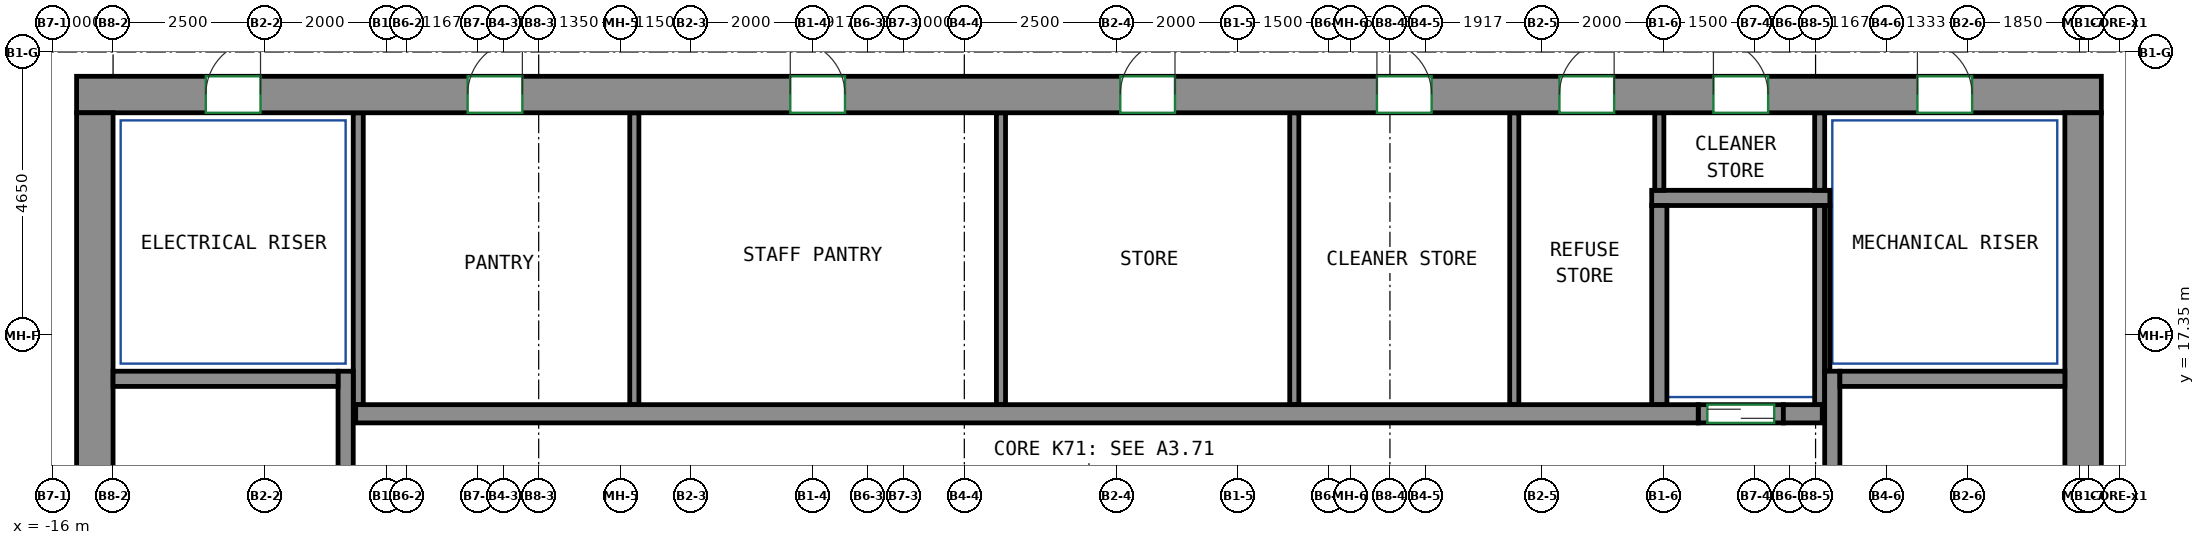
"""IFC4 building model, lengths in metres.
Left out: names, types, materials, properties, quantities, classifications, styles, units other than length and angle.
Written with IfcOpenShell. Run it as: python <this file> out.ifc"""

import sys

from ifc_helpers import new_model, si_unit, direction, frame, frame_2d, origin, place, context, subcontext, project, spatial, rectangle, extrude, source, transform, mapped, element, fill, save


model = new_model("IFC4")
c1 = context("Model", 3, precision=1e-05, world=origin(), true_north=direction((0.0, 1.0)))
c2 = subcontext(c1, "Body", "Model", "MODEL_VIEW")
j1 = project(units=[si_unit("LENGTHUNIT", "METRE"), si_unit("PLANEANGLEUNIT", "RADIAN")], contexts=[c1])
p1 = place(None, origin())
s1 = spatial("IfcSite", under=j1, at=p1, CompositionType="ELEMENT")
p2 = place(p1, origin())
s2 = spatial("IfcBuilding", under=s1, at=p2, CompositionType="ELEMENT")
p3 = place(p2, frame((0.0, 0.0, 284.0)))
s3 = spatial("IfcBuildingStorey", under=s2, at=p3, CompositionType="ELEMENT", Elevation=284.0)
m1 = source(origin(), c2, "Body", "SweptSolid", [
    extrude(rectangle(XDim=33.3, YDim=0.6, at=frame_2d((16.65, 0.0))), origin(), (0.0, 0.0, 1.0), 3.12),
])
p4 = place(p3, frame((-15.6, 21.3, 0.0), z_axis=(0.0, 0.0, 1.0), x_axis=(1.0, 0.0, 0.0)))
e1 = element("IfcWall", 1, at=p4, inside=s3, PredefinedType="SHEAR", context=c2, shape_type="MappedRepresentation", body=[
    mapped(m1, transform((0.0, 0.0, 0.0))),
])
p5 = place(p4, frame((6.431, 0.0, 0.0)))
e2 = element("IfcOpeningElement", 2, at=p5, cuts=e1, PredefinedType="OPENING", context=c2, shape_type="SweptSolid", body=[
    extrude(rectangle(XDim=0.9, YDim=2.1, at=frame_2d((0.45, 1.05))), frame((0.0, 0.31, 0.0), z_axis=(0.0, -1.0, 0.0), x_axis=(1.0, 0.0, 0.0)), (0.0, 0.0, 1.0), 0.62),
])
p6 = place(p4, frame((11.738, 0.0, 0.0)))
e3 = element("IfcOpeningElement", 3, at=p6, cuts=e1, PredefinedType="OPENING", context=c2, shape_type="SweptSolid", body=[
    extrude(rectangle(XDim=0.9, YDim=2.1, at=frame_2d((0.45, 1.05))), frame((0.0, 0.31, 0.0), z_axis=(0.0, -1.0, 0.0), x_axis=(1.0, 0.0, 0.0)), (0.0, 0.0, 1.0), 0.62),
])
p7 = place(p4, frame((17.165, 0.0, 0.0)))
e4 = element("IfcOpeningElement", 4, at=p7, cuts=e1, PredefinedType="OPENING", context=c2, shape_type="SweptSolid", body=[
    extrude(rectangle(XDim=0.9, YDim=2.1, at=frame_2d((0.45, 1.05))), frame((0.0, 0.31, 0.0), z_axis=(0.0, -1.0, 0.0), x_axis=(1.0, 0.0, 0.0)), (0.0, 0.0, 1.0), 0.62),
])
p8 = place(p4, frame((21.386, 0.0, 0.0)))
e5 = element("IfcOpeningElement", 5, at=p8, cuts=e1, PredefinedType="OPENING", context=c2, shape_type="SweptSolid", body=[
    extrude(rectangle(XDim=0.9, YDim=2.1, at=frame_2d((0.45, 1.05))), frame((0.0, 0.31, 0.0), z_axis=(0.0, -1.0, 0.0), x_axis=(1.0, 0.0, 0.0)), (0.0, 0.0, 1.0), 0.62),
])
p9 = place(p4, frame((24.387, 0.0, 0.0)))
e6 = element("IfcOpeningElement", 6, at=p9, cuts=e1, PredefinedType="OPENING", context=c2, shape_type="SweptSolid", body=[
    extrude(rectangle(XDim=0.9, YDim=2.1, at=frame_2d((0.45, 1.05))), frame((0.0, 0.31, 0.0), z_axis=(0.0, -1.0, 0.0), x_axis=(1.0, 0.0, 0.0)), (0.0, 0.0, 1.0), 0.62),
])
p10 = place(p4, frame((26.92, 0.0, 0.0)))
e7 = element("IfcOpeningElement", 7, at=p10, cuts=e1, PredefinedType="OPENING", context=c2, shape_type="SweptSolid", body=[
    extrude(rectangle(XDim=0.9, YDim=2.1, at=frame_2d((0.45, 1.05))), frame((0.0, 0.31, 0.0), z_axis=(0.0, -1.0, 0.0), x_axis=(1.0, 0.0, 0.0)), (0.0, 0.0, 1.0), 0.62),
])
p11 = place(p4, frame((2.125, 0.0, 0.0)))
e8 = element("IfcOpeningElement", 8, at=p11, cuts=e1, PredefinedType="OPENING", context=c2, shape_type="SweptSolid", body=[
    extrude(rectangle(XDim=0.9, YDim=2.1, at=frame_2d((0.45, 1.05))), frame((0.0, 0.31, 0.0), z_axis=(0.0, -1.0, 0.0), x_axis=(1.0, 0.0, 0.0)), (0.0, 0.0, 1.0), 0.62),
])
p12 = place(p4, frame((30.275, 0.0, 0.0)))
e9 = element("IfcOpeningElement", 9, at=p12, cuts=e1, PredefinedType="OPENING", context=c2, shape_type="SweptSolid", body=[
    extrude(rectangle(XDim=0.9, YDim=2.1, at=frame_2d((0.45, 1.05))), frame((0.0, 0.31, 0.0), z_axis=(0.0, -1.0, 0.0), x_axis=(1.0, 0.0, 0.0)), (0.0, 0.0, 1.0), 0.62),
])
m2 = source(origin(), c2, "Body", "SweptSolid", [
    extrude(rectangle(XDim=12.0, YDim=0.6, at=frame_2d((6.0, 0.0))), origin(), (0.0, 0.0, 1.0), 3.12),
])
for number, where, z_axis, x_axis in (
    (10, (-15.3, 9.0, 0.0), (0.0, 0.0, 1.0), (0.0, 1.0, 0.0)),
    (11, (17.4, 9.0, 0.0), (0.0, 0.0, 1.0), (0.0, 1.0, 0.0)),
):
    element("IfcWall", number, at=place(p3, frame(where, z_axis=z_axis, x_axis=x_axis)), inside=s3, PredefinedType="SHEAR", context=c2, shape_type="MappedRepresentation", body=[
        mapped(m2, transform((0.0, 0.0, 0.0))),
    ])
m3 = source(origin(), c2, "Body", "SweptSolid", [
    extrude(rectangle(XDim=7.75, YDim=0.25, at=frame_2d((3.875, 0.0))), origin(), (0.0, 0.0, 1.0), 3.12),
])
p13 = place(p3, frame((-11.175, 9.0, 0.0), z_axis=(0.0, 0.0, 1.0), x_axis=(0.0, 1.0, 0.0)))
e12 = element("IfcWall", 12, at=p13, inside=s3, PredefinedType="SHEAR", context=c2, shape_type="MappedRepresentation", body=[
    mapped(m3, transform((0.0, 0.0, 0.0))),
])
m4 = source(origin(), c2, "Body", "SweptSolid", [
    extrude(rectangle(XDim=3.7, YDim=0.25, at=frame_2d((1.85, 0.0))), origin(), (0.0, 0.0, 1.0), 3.12),
])
p14 = place(p3, frame((-15.0, 16.625, 0.0), z_axis=(0.0, 0.0, 1.0), x_axis=(1.0, 0.0, 0.0)))
e13 = element("IfcWall", 13, at=p14, inside=s3, PredefinedType="SHEAR", context=c2, shape_type="MappedRepresentation", body=[
    mapped(m4, transform((0.0, 0.0, 0.0))),
])
p15 = place(p3, frame((13.275, 9.0, 0.0), z_axis=(0.0, 0.0, 1.0), x_axis=(0.0, 1.0, 0.0)))
e14 = element("IfcWall", 14, at=p15, inside=s3, PredefinedType="SHEAR", context=c2, shape_type="MappedRepresentation", body=[
    mapped(m3, transform((0.0, 0.0, 0.0))),
])
m5 = source(origin(), c2, "Body", "SweptSolid", [
    extrude(rectangle(XDim=3.7, YDim=0.25, at=frame_2d((1.85, 0.0))), origin(), (0.0, 0.0, 1.0), 3.12),
])
p16 = place(p3, frame((13.4, 16.625, 0.0), z_axis=(0.0, 0.0, 1.0), x_axis=(1.0, 0.0, 0.0)))
e15 = element("IfcWall", 15, at=p16, inside=s3, PredefinedType="SHEAR", context=c2, shape_type="MappedRepresentation", body=[
    mapped(m5, transform((0.0, 0.0, 0.0))),
])
m6 = source(origin(), c2, "Body", "SweptSolid", [
    extrude(rectangle(XDim=22.08, YDim=0.3, at=frame_2d((11.04, 0.0))), origin(), (0.0, 0.0, 1.0), 3.12),
])
p17 = place(p3, frame((-11.01, 16.05, 0.0), z_axis=(0.0, 0.0, 1.0), x_axis=(1.0, 0.0, 0.0)))
e16 = element("IfcWall", 16, at=p17, inside=s3, PredefinedType="SHEAR", context=c2, shape_type="MappedRepresentation", body=[
    mapped(m6, transform((0.0, 0.0, 0.0))),
])
m7 = source(origin(), c2, "Body", "SweptSolid", [
    extrude(rectangle(XDim=0.64, YDim=0.3, at=frame_2d((0.32, 0.0))), origin(), (0.0, 0.0, 1.0), 3.12),
])
p18 = place(p3, frame((12.47, 16.05, 0.0), z_axis=(0.0, 0.0, 1.0), x_axis=(1.0, 0.0, 0.0)))
e17 = element("IfcWall", 17, at=p18, inside=s3, PredefinedType="SHEAR", context=c2, shape_type="MappedRepresentation", body=[
    mapped(m7, transform((0.0, 0.0, 0.0))),
])
m8 = source(origin(), c2, "Body", "SweptSolid", [
    extrude(rectangle(XDim=1.4, YDim=0.3, at=frame_2d((0.7, 0.0))), origin(), (0.0, 0.0, 1.0), 3.12),
])
p19 = place(p3, frame((11.07, 16.05, 0.0), z_axis=(0.0, 0.0, 1.0), x_axis=(1.0, 0.0, 0.0)))
e18 = element("IfcWall", 18, at=p19, inside=s3, PredefinedType="PARTITIONING", context=c2, shape_type="MappedRepresentation", body=[
    mapped(m8, transform((0.0, 0.0, 0.0))),
])
p20 = place(p19, frame((0.15, 0.0, 0.0)))
e19 = element("IfcOpeningElement", 19, at=p20, cuts=e18, PredefinedType="OPENING", context=c2, shape_type="SweptSolid", body=[
    extrude(rectangle(XDim=1.1, YDim=2.1, at=frame_2d((0.55, 1.05))), frame((0.0, 0.16, 0.0), z_axis=(0.0, -1.0, 0.0), x_axis=(1.0, 0.0, 0.0)), (0.0, 0.0, 1.0), 0.32),
])
m9 = source(origin(), c2, "Body", "SweptSolid", [
    extrude(rectangle(XDim=2.93, YDim=0.25, at=frame_2d((1.465, 0.0))), origin(), (0.0, 0.0, 1.0), 3.12),
])
p21 = place(p3, frame((10.305, 19.6, 0.0), z_axis=(0.0, 0.0, 1.0), x_axis=(1.0, 0.0, 0.0)))
e20 = element("IfcWall", 20, at=p21, inside=s3, PredefinedType="PARTITIONING", context=c2, shape_type="MappedRepresentation", body=[
    mapped(m9, transform((0.0, 0.0, 0.0))),
])
m10 = source(origin(), c2, "Body", "SweptSolid", [
    extrude(rectangle(XDim=3.275, YDim=0.165, at=frame_2d((1.638, 0.0))), origin(), (0.0, 0.0, 1.0), 3.12),
])
p22 = place(p3, frame((13.067, 16.2, 0.0), z_axis=(0.0, 0.0, 1.0), x_axis=(0.0, 1.0, 0.0)))
e21 = element("IfcWall", 21, at=p22, inside=s3, PredefinedType="PARTITIONING", context=c2, shape_type="MappedRepresentation", body=[
    mapped(m10, transform((0.0, 0.0, 0.0))),
])
m11 = source(origin(), c2, "Body", "SweptSolid", [
    extrude(rectangle(XDim=1.275, YDim=0.165, at=frame_2d((0.637, 0.0))), origin(), (0.0, 0.0, 1.0), 3.12),
])
p23 = place(p3, frame((13.067, 19.725, 0.0), z_axis=(0.0, 0.0, 1.0), x_axis=(0.0, 1.0, 0.0)))
e22 = element("IfcWall", 22, at=p23, inside=s3, PredefinedType="PARTITIONING", context=c2, shape_type="MappedRepresentation", body=[
    mapped(m11, transform((0.0, 0.0, 0.0))),
])
m12 = source(origin(), c2, "Body", "SweptSolid", [
    extrude(rectangle(XDim=4.8, YDim=0.165, at=frame_2d((2.4, 0.0))), origin(), (0.0, 0.0, 1.0), 3.12),
])
p24 = place(p3, frame((-10.968, 16.2, 0.0), z_axis=(0.0, 0.0, 1.0), x_axis=(0.0, 1.0, 0.0)))
e23 = element("IfcWall", 23, at=p24, inside=s3, PredefinedType="PARTITIONING", context=c2, shape_type="MappedRepresentation", body=[
    mapped(m12, transform((0.0, 0.0, 0.0))),
])
m13 = source(origin(), c2, "Body", "SweptSolid", [
    extrude(rectangle(XDim=3.275, YDim=0.25, at=frame_2d((1.638, 0.0))), origin(), (0.0, 0.0, 1.0), 3.12),
])
p25 = place(p3, frame((10.43, 16.2, 0.0), z_axis=(0.0, 0.0, 1.0), x_axis=(0.0, 1.0, 0.0)))
e24 = element("IfcWall", 24, at=p25, inside=s3, PredefinedType="PARTITIONING", context=c2, shape_type="MappedRepresentation", body=[
    mapped(m13, transform((0.0, 0.0, 0.0))),
])
m14 = source(origin(), c2, "Body", "SweptSolid", [
    extrude(rectangle(XDim=2.725, YDim=0.085, at=frame_2d((1.363, 0.0))), origin(), (0.0, 0.0, 1.0), 3.12),
])
p26 = place(p3, frame((13.192, 16.75, 0.0), z_axis=(0.0, 0.0, 1.0), x_axis=(0.0, 1.0, 0.0)))
e25 = element("IfcWall", 25, at=p26, inside=s3, PredefinedType="PARTITIONING", context=c2, shape_type="MappedRepresentation", body=[
    mapped(m14, transform((0.0, 0.0, 0.0))),
])
m15 = source(origin(), c2, "Body", "SweptSolid", [
    extrude(rectangle(XDim=4.8, YDim=0.15, at=frame_2d((2.4, 0.0))), origin(), (0.0, 0.0, 1.0), 3.12),
])
for number, where, z_axis, x_axis in (
    (26, (-6.427, 16.2, 0.0), (0.0, 0.0, 1.0), (0.0, 1.0, 0.0)),
    (27, (-0.397, 16.2, 0.0), (0.0, 0.0, 1.0), (0.0, 1.0, 0.0)),
    (28, (4.427, 16.2, 0.0), (0.0, 0.0, 1.0), (0.0, 1.0, 0.0)),
    (29, (8.045, 16.2, 0.0), (0.0, 0.0, 1.0), (0.0, 1.0, 0.0)),
):
    element("IfcWall", number, at=place(p3, frame(where, z_axis=z_axis, x_axis=x_axis)), inside=s3, PredefinedType="PARTITIONING", context=c2, shape_type="MappedRepresentation", body=[
        mapped(m15, transform((0.0, 0.0, 0.0))),
    ])
m16 = source(origin(), c2, "Body", "SweptSolid", [
    extrude(rectangle(XDim=1.275, YDim=0.15, at=frame_2d((0.637, 0.0))), origin(), (0.0, 0.0, 1.0), 3.12),
])
p27 = place(p3, frame((10.43, 19.725, 0.0), z_axis=(0.0, 0.0, 1.0), x_axis=(0.0, 1.0, 0.0)))
e30 = element("IfcWall", 30, at=p27, inside=s3, PredefinedType="PARTITIONING", context=c2, shape_type="MappedRepresentation", body=[
    mapped(m16, transform((0.0, 0.0, 0.0))),
])
p28 = place(p20, origin())
e31 = element("IfcDoor", 31, at=p28, inside=s3, OperationType="DOUBLE_DOOR_SLIDING", PredefinedType="DOOR", context=c2, shape_type="SweptSolid", body=[
    extrude(rectangle(XDim=1.1, YDim=2.1, at=frame_2d((0.55, 1.05))), frame((0.0, 0.025, 0.0), z_axis=(0.0, -1.0, 0.0), x_axis=(1.0, 0.0, 0.0)), (0.0, 0.0, 1.0), 0.05),
])
fill(e19, e31)
p29 = place(p5, origin())
e32 = element("IfcDoor", 32, at=p29, inside=s3, OperationType="SINGLE_SWING_RIGHT", PredefinedType="DOOR", context=c2, shape_type="SweptSolid", body=[
    extrude(rectangle(XDim=0.9, YDim=2.1, at=frame_2d((0.45, 1.05))), frame((0.0, -0.155, 0.0), z_axis=(0.0, -1.0, 0.0), x_axis=(1.0, 0.0, 0.0)), (0.0, 0.0, 1.0), 0.05),
])
fill(e2, e32)
p30 = place(p6, origin())
e33 = element("IfcDoor", 33, at=p30, inside=s3, OperationType="SINGLE_SWING_LEFT", PredefinedType="DOOR", context=c2, shape_type="SweptSolid", body=[
    extrude(rectangle(XDim=0.9, YDim=2.1, at=frame_2d((0.45, 1.05))), frame((0.0, -0.155, 0.0), z_axis=(0.0, -1.0, 0.0), x_axis=(1.0, 0.0, 0.0)), (0.0, 0.0, 1.0), 0.05),
])
fill(e3, e33)
p31 = place(p7, origin())
e34 = element("IfcDoor", 34, at=p31, inside=s3, OperationType="SINGLE_SWING_RIGHT", PredefinedType="DOOR", context=c2, shape_type="SweptSolid", body=[
    extrude(rectangle(XDim=0.9, YDim=2.1, at=frame_2d((0.45, 1.05))), frame((0.0, -0.155, 0.0), z_axis=(0.0, -1.0, 0.0), x_axis=(1.0, 0.0, 0.0)), (0.0, 0.0, 1.0), 0.05),
])
fill(e4, e34)
p32 = place(p8, origin())
e35 = element("IfcDoor", 35, at=p32, inside=s3, OperationType="SINGLE_SWING_LEFT", PredefinedType="DOOR", context=c2, shape_type="SweptSolid", body=[
    extrude(rectangle(XDim=0.9, YDim=2.1, at=frame_2d((0.45, 1.05))), frame((0.0, -0.155, 0.0), z_axis=(0.0, -1.0, 0.0), x_axis=(1.0, 0.0, 0.0)), (0.0, 0.0, 1.0), 0.05),
])
fill(e5, e35)
p33 = place(p9, origin())
e36 = element("IfcDoor", 36, at=p33, inside=s3, OperationType="SINGLE_SWING_RIGHT", PredefinedType="DOOR", context=c2, shape_type="SweptSolid", body=[
    extrude(rectangle(XDim=0.9, YDim=2.1, at=frame_2d((0.45, 1.05))), frame((0.0, -0.155, 0.0), z_axis=(0.0, -1.0, 0.0), x_axis=(1.0, 0.0, 0.0)), (0.0, 0.0, 1.0), 0.05),
])
fill(e6, e36)
p34 = place(p10, origin())
e37 = element("IfcDoor", 37, at=p34, inside=s3, OperationType="SINGLE_SWING_LEFT", PredefinedType="DOOR", context=c2, shape_type="SweptSolid", body=[
    extrude(rectangle(XDim=0.9, YDim=2.1, at=frame_2d((0.45, 1.05))), frame((0.0, -0.155, 0.0), z_axis=(0.0, -1.0, 0.0), x_axis=(1.0, 0.0, 0.0)), (0.0, 0.0, 1.0), 0.05),
])
fill(e7, e37)
p35 = place(p11, origin())
e38 = element("IfcDoor", 38, at=p35, inside=s3, OperationType="SINGLE_SWING_RIGHT", PredefinedType="DOOR", context=c2, shape_type="SweptSolid", body=[
    extrude(rectangle(XDim=0.9, YDim=2.1, at=frame_2d((0.45, 1.05))), frame((0.0, -0.155, 0.0), z_axis=(0.0, -1.0, 0.0), x_axis=(1.0, 0.0, 0.0)), (0.0, 0.0, 1.0), 0.05),
])
fill(e8, e38)
p36 = place(p12, origin())
e39 = element("IfcDoor", 39, at=p36, inside=s3, OperationType="SINGLE_SWING_LEFT", PredefinedType="DOOR", context=c2, shape_type="SweptSolid", body=[
    extrude(rectangle(XDim=0.9, YDim=2.1, at=frame_2d((0.45, 1.05))), frame((0.0, -0.155, 0.0), z_axis=(0.0, -1.0, 0.0), x_axis=(1.0, 0.0, 0.0)), (0.0, 0.0, 1.0), 0.05),
])
fill(e9, e39)
save(model, sys.argv[1])
